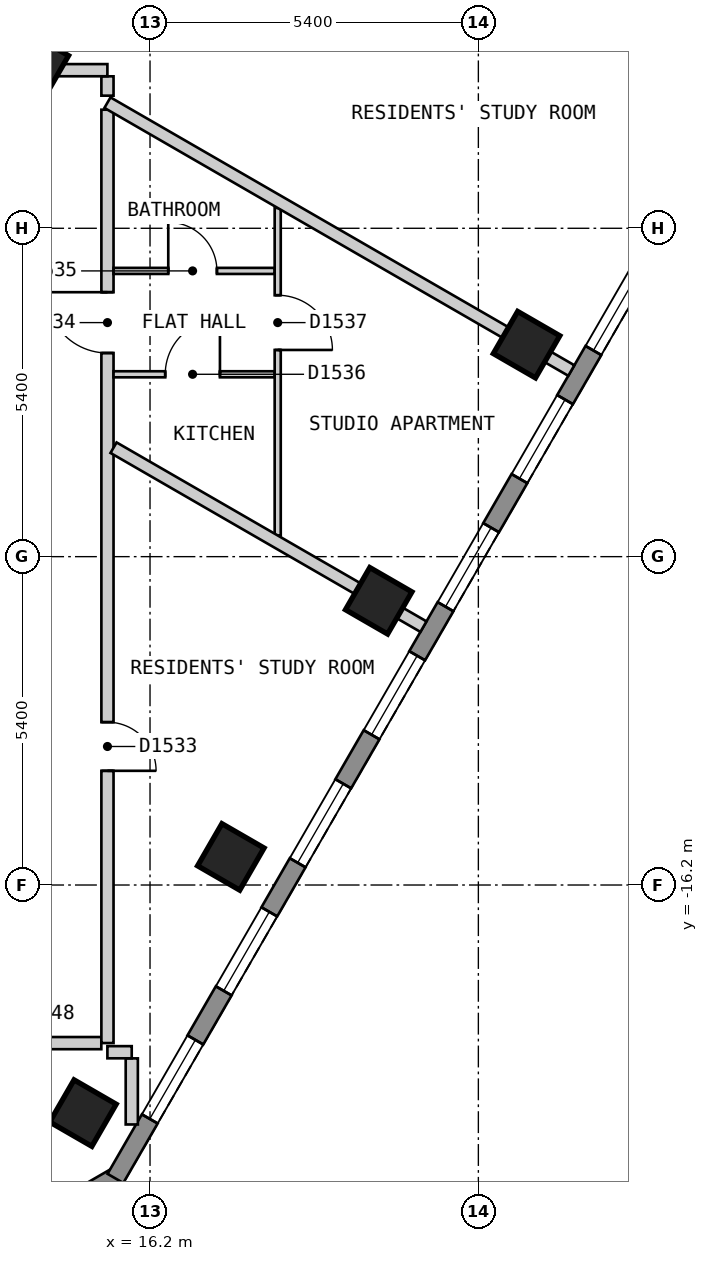
"""IFC4 building model, lengths in metres.
Left out: names, types, materials, properties, quantities, classifications, styles, units other than length and angle.
Written with IfcOpenShell. Run it as: python <this file> out.ifc"""

import sys

from ifc_helpers import new_model, si_unit, direction, frame, frame_2d, origin, origin_2d, place, context, subcontext, project, spatial, polyline, rectangle, outline, extrude, element, fill, save


model = new_model("IFC4")
c1 = context("Model", 3, precision=1e-05, world=origin(), true_north=direction((0.0, 1.0)))
c2 = subcontext(c1, "Body", "Model", "MODEL_VIEW")
j1 = project(units=[si_unit("LENGTHUNIT", "METRE"), si_unit("PLANEANGLEUNIT", "RADIAN")], contexts=[c1])
p1 = place(None, origin())
s1 = spatial("IfcSite", under=j1, at=p1, CompositionType="ELEMENT")
p2 = place(p1, origin())
s2 = spatial("IfcBuilding", under=s1, at=p2, CompositionType="ELEMENT")
p3 = place(p2, frame((0.0, 0.0, 196.2)))
s3 = spatial("IfcBuildingStorey", under=s2, at=p3, CompositionType="ELEMENT", Elevation=196.2)
for number, where, z_axis, x_axis in (
    (1, (15.097, -19.951, 0.0), (0.0, 0.0, 1.0), (0.5, 0.866, 0.0)),
    (2, (17.529, -15.738, 0.0), (0.0, 0.0, 1.0), (0.5, 0.866, 0.0)),
    (3, (19.961, -11.526, 0.0), (0.0, 0.0, 1.0), (0.5, 0.866, 0.0)),
    (4, (22.393, -7.314, 0.0), (0.0, 0.0, 1.0), (0.5, 0.866, 0.0)),
):
    element("IfcColumn", number, at=place(p3, frame(where, z_axis=z_axis, x_axis=x_axis)), inside=s3, PredefinedType="COLUMN", context=c2, shape_type="SweptSolid", body=[
        extrude(rectangle(XDim=0.8, YDim=0.8, at=origin_2d()), origin(), (0.0, 0.0, 1.0), 3.0),
    ])
p4 = place(p3, frame((14.382, -2.689, 0.0), z_axis=(0.0, 0.0, 1.0), x_axis=(0.5, 0.866025403784, 0.0)))
e5 = element("IfcColumn", 5, at=p4, inside=s3, PredefinedType="COLUMN", context=c2, shape_type="SweptSolid", body=[
    extrude(rectangle(XDim=0.7, YDim=0.7, at=origin_2d()), origin(), (0.0, 0.0, 1.0), 3.0),
])
p5 = place(p3, frame((11.356, -23.47, 0.0), z_axis=(0.0, 0.0, 1.0), x_axis=(0.866022959057, 0.500004234368, 0.0)))
e6 = element("IfcWall", 6, at=p5, inside=s3, PredefinedType="SOLIDWALL", context=c2, shape_type="SweptSolid", body=[
    extrude(outline(polyline([(0.0, -0.15), (5.0, -0.15), (4.92, 0.15), (0.08, 0.15), (0.0, -0.15)])), origin(), (0.0, 0.0, 1.0), 2.6),
])
p6 = place(p5, frame((0.65, 0.0, 0.15)))
e7 = element("IfcOpeningElement", 7, at=p6, cuts=e6, PredefinedType="OPENING", context=c2, shape_type="SweptSolid", body=[
    extrude(rectangle(XDim=1.2, YDim=2.1, at=frame_2d((0.6, 1.05))), frame((0.0, 0.16, 0.0), z_axis=(0.0, -1.0, 0.0), x_axis=(1.0, 0.0, 0.0)), (0.0, 0.0, 1.0), 0.32),
])
p7 = place(p5, frame((3.149, 0.0, 0.15)))
e8 = element("IfcOpeningElement", 8, at=p7, cuts=e6, PredefinedType="OPENING", context=c2, shape_type="SweptSolid", body=[
    extrude(rectangle(XDim=1.2, YDim=2.1, at=frame_2d((0.6, 1.05))), frame((0.0, 0.16, 0.0), z_axis=(0.0, -1.0, 0.0), x_axis=(1.0, 0.0, 0.0)), (0.0, 0.0, 1.0), 0.32),
])
p8 = place(p3, frame((15.631, -21.025, 0.0), z_axis=(0.0, 0.0, 1.0), x_axis=(0.500018670445, 0.86601462413, 0.0)))
e9 = element("IfcWall", 9, at=p8, inside=s3, PredefinedType="SOLIDWALL", context=c2, shape_type="SweptSolid", body=[
    extrude(outline(polyline([(0.0, -0.15), (20.785, -0.15), (20.705, 0.15), (0.08, 0.15), (0.0, -0.15)])), origin(), (0.0, 0.0, 1.0), 2.6),
])
p9 = place(p8, frame((1.13, 0.0, 0.15)))
e10 = element("IfcOpeningElement", 10, at=p9, cuts=e9, PredefinedType="OPENING", context=c2, shape_type="SweptSolid", body=[
    extrude(rectangle(XDim=1.5, YDim=2.1, at=frame_2d((0.75, 1.05))), frame((0.0, 0.16, 0.0), z_axis=(0.0, -1.0, 0.0), x_axis=(1.0, 0.0, 0.0)), (0.0, 0.0, 1.0), 0.32),
])
p10 = place(p8, frame((3.562, 0.0, 0.15)))
e11 = element("IfcOpeningElement", 11, at=p10, cuts=e9, PredefinedType="OPENING", context=c2, shape_type="SweptSolid", body=[
    extrude(rectangle(XDim=1.5, YDim=2.1, at=frame_2d((0.75, 1.05))), frame((0.0, 0.16, 0.0), z_axis=(0.0, -1.0, 0.0), x_axis=(1.0, 0.0, 0.0)), (0.0, 0.0, 1.0), 0.32),
])
p11 = place(p8, frame((5.994, 0.0, 0.15)))
e12 = element("IfcOpeningElement", 12, at=p11, cuts=e9, PredefinedType="OPENING", context=c2, shape_type="SweptSolid", body=[
    extrude(rectangle(XDim=1.5, YDim=2.1, at=frame_2d((0.75, 1.05))), frame((0.0, 0.16, 0.0), z_axis=(0.0, -1.0, 0.0), x_axis=(1.0, 0.0, 0.0)), (0.0, 0.0, 1.0), 0.32),
])
p12 = place(p8, frame((8.425, 0.0, 0.15)))
e13 = element("IfcOpeningElement", 13, at=p12, cuts=e9, PredefinedType="OPENING", context=c2, shape_type="SweptSolid", body=[
    extrude(rectangle(XDim=1.5, YDim=2.1, at=frame_2d((0.75, 1.05))), frame((0.0, 0.16, 0.0), z_axis=(0.0, -1.0, 0.0), x_axis=(1.0, 0.0, 0.0)), (0.0, 0.0, 1.0), 0.32),
])
p13 = place(p8, frame((10.857, 0.0, 0.15)))
e14 = element("IfcOpeningElement", 14, at=p13, cuts=e9, PredefinedType="OPENING", context=c2, shape_type="SweptSolid", body=[
    extrude(rectangle(XDim=1.5, YDim=2.1, at=frame_2d((0.75, 1.05))), frame((0.0, 0.16, 0.0), z_axis=(0.0, -1.0, 0.0), x_axis=(1.0, 0.0, 0.0)), (0.0, 0.0, 1.0), 0.32),
])
p14 = place(p8, frame((13.289, 0.0, 0.15)))
e15 = element("IfcOpeningElement", 15, at=p14, cuts=e9, PredefinedType="OPENING", context=c2, shape_type="SweptSolid", body=[
    extrude(rectangle(XDim=1.5, YDim=2.1, at=frame_2d((0.75, 1.05))), frame((0.0, 0.16, 0.0), z_axis=(0.0, -1.0, 0.0), x_axis=(1.0, 0.0, 0.0)), (0.0, 0.0, 1.0), 0.32),
])
p15 = place(p8, frame((15.722, 0.0, 0.15)))
e16 = element("IfcOpeningElement", 16, at=p15, cuts=e9, PredefinedType="OPENING", context=c2, shape_type="SweptSolid", body=[
    extrude(rectangle(XDim=1.5, YDim=2.1, at=frame_2d((0.75, 1.05))), frame((0.0, 0.16, 0.0), z_axis=(0.0, -1.0, 0.0), x_axis=(1.0, 0.0, 0.0)), (0.0, 0.0, 1.0), 0.32),
])
p16 = place(p8, frame((18.154, 0.0, 0.15)))
e17 = element("IfcOpeningElement", 17, at=p16, cuts=e9, PredefinedType="OPENING", context=c2, shape_type="SweptSolid", body=[
    extrude(rectangle(XDim=1.5, YDim=2.1, at=frame_2d((0.75, 1.05))), frame((0.0, 0.16, 0.0), z_axis=(0.0, -1.0, 0.0), x_axis=(1.0, 0.0, 0.0)), (0.0, 0.0, 1.0), 0.32),
])
p17 = place(p3, frame((15.5, -2.901, 0.0), z_axis=(0.0, 0.0, 1.0), x_axis=(0.0, -1.0, 0.0)))
e18 = element("IfcWall", 18, at=p17, inside=s3, PredefinedType="PARTITIONING", context=c2, shape_type="SweptSolid", body=[
    extrude(rectangle(XDim=0.318, YDim=0.2, at=frame_2d((0.159, 0.0))), origin(), (0.0, 0.0, 1.0), 2.6),
])
p18 = place(p3, frame((13.3, -18.8, 0.0), z_axis=(0.0, 0.0, 1.0), x_axis=(1.0, 0.0, 0.0)))
e19 = element("IfcWall", 19, at=p18, inside=s3, PredefinedType="PARTITIONING", context=c2, shape_type="SweptSolid", body=[
    extrude(rectangle(XDim=2.099, YDim=0.2, at=frame_2d((1.049, 0.0))), origin(), (0.0, 0.0, 1.0), 2.6),
])
p19 = place(p18, frame((0.2, 0.0, 0.0)))
e20 = element("IfcOpeningElement", 20, at=p19, cuts=e19, PredefinedType="OPENING", context=c2, shape_type="SweptSolid", body=[
    extrude(rectangle(XDim=1.0, YDim=2.1, at=frame_2d((0.5, 1.05))), frame((0.0, 0.11, 0.0), z_axis=(0.0, -1.0, 0.0), x_axis=(1.0, 0.0, 0.0)), (0.0, 0.0, 1.0), 0.22),
])
p20 = place(p3, frame((14.433, -2.8, 0.0), z_axis=(0.0, 0.0, 1.0), x_axis=(1.0, 0.0, 0.0)))
e21 = element("IfcWall", 21, at=p20, inside=s3, PredefinedType="PARTITIONING", context=c2, shape_type="SweptSolid", body=[
    extrude(rectangle(XDim=1.066, YDim=0.2, at=frame_2d((0.533, 0.0))), origin(), (0.0, 0.0, 1.0), 2.6),
])
p21 = place(p3, frame((14.318, -2.8, 0.0), z_axis=(0.0, 0.0, 1.0), x_axis=(0.49964693309, 0.866229151122, 0.0)))
e22 = element("IfcWall", 22, at=p21, inside=s3, PredefinedType="PARTITIONING", context=c2, shape_type="SweptSolid", body=[
    extrude(rectangle(XDim=2.426, YDim=0.2, at=frame_2d((1.213, 0.0))), origin(), (0.0, 0.0, 1.0), 2.6),
])
p22 = place(p21, frame((0.886, 0.0, 0.0)))
e23 = element("IfcOpeningElement", 23, at=p22, cuts=e22, PredefinedType="OPENING", context=c2, shape_type="SweptSolid", body=[
    extrude(rectangle(XDim=0.8, YDim=2.1, at=frame_2d((0.4, 1.05))), frame((0.0, 0.11, 0.0), z_axis=(0.0, -1.0, 0.0), x_axis=(1.0, 0.0, 0.0)), (0.0, 0.0, 1.0), 0.22),
])
p23 = place(p3, frame((15.5, -18.799, 0.0), z_axis=(0.0, 0.0, 1.0), x_axis=(0.0, 1.0, 0.0)))
e24 = element("IfcWall", 24, at=p23, inside=s3, PredefinedType="PARTITIONING", context=c2, shape_type="SweptSolid", body=[
    extrude(rectangle(XDim=15.349, YDim=0.2, at=frame_2d((7.675, 0.0))), origin(), (0.0, 0.0, 1.0), 2.6),
])
p24 = place(p23, frame((4.477, 0.0, 0.0)))
e25 = element("IfcOpeningElement", 25, at=p24, cuts=e24, PredefinedType="OPENING", context=c2, shape_type="SweptSolid", body=[
    extrude(rectangle(XDim=0.8, YDim=2.1, at=frame_2d((0.4, 1.05))), frame((0.0, 0.11, 0.0), z_axis=(0.0, -1.0, 0.0), x_axis=(1.0, 0.0, 0.0)), (0.0, 0.0, 1.0), 0.22),
])
p25 = place(p23, frame((11.348, 0.0, 0.0)))
e26 = element("IfcOpeningElement", 26, at=p25, cuts=e24, PredefinedType="OPENING", context=c2, shape_type="SweptSolid", body=[
    extrude(rectangle(XDim=1.0, YDim=2.1, at=frame_2d((0.5, 1.05))), frame((0.0, 0.11, 0.0), z_axis=(0.0, -1.0, 0.0), x_axis=(1.0, 0.0, 0.0)), (0.0, 0.0, 1.0), 0.22),
])
p26 = place(p3, frame((15.6, -6.101, 0.0), z_axis=(0.0, 0.0, 1.0), x_axis=(1.0, 0.0, 0.0)))
e27 = element("IfcWall", 27, at=p26, inside=s3, PredefinedType="PARTITIONING", context=c2, shape_type="SweptSolid", body=[
    extrude(rectangle(XDim=2.65, YDim=0.1, at=frame_2d((1.325, 0.0))), origin(), (0.0, 0.0, 1.0), 2.6),
])
p27 = place(p26, frame((0.9, 0.0, 0.0)))
e28 = element("IfcOpeningElement", 28, at=p27, cuts=e27, PredefinedType="OPENING", context=c2, shape_type="SweptSolid", body=[
    extrude(rectangle(XDim=0.8, YDim=2.1, at=frame_2d((0.4, 1.05))), frame((0.0, 0.06, 0.0), z_axis=(0.0, -1.0, 0.0), x_axis=(1.0, 0.0, 0.0)), (0.0, 0.0, 1.0), 0.12),
])
p28 = place(p3, frame((15.6, -7.801, 0.0), z_axis=(0.0, 0.0, 1.0), x_axis=(1.0, 0.0, 0.0)))
e29 = element("IfcWall", 29, at=p28, inside=s3, PredefinedType="PARTITIONING", context=c2, shape_type="SweptSolid", body=[
    extrude(rectangle(XDim=2.65, YDim=0.1, at=frame_2d((1.325, 0.0))), origin(), (0.0, 0.0, 1.0), 2.6),
])
p29 = place(p28, frame((0.85, 0.0, 0.0)))
e30 = element("IfcOpeningElement", 30, at=p29, cuts=e29, PredefinedType="OPENING", context=c2, shape_type="SweptSolid", body=[
    extrude(rectangle(XDim=0.9, YDim=2.1, at=frame_2d((0.45, 1.05))), frame((0.0, 0.06, 0.0), z_axis=(0.0, -1.0, 0.0), x_axis=(1.0, 0.0, 0.0)), (0.0, 0.0, 1.0), 0.12),
])
p30 = place(p3, frame((18.3, -10.452, 0.0), z_axis=(0.0, 0.0, 1.0), x_axis=(0.0, 1.0, 0.0)))
e31 = element("IfcWall", 31, at=p30, inside=s3, PredefinedType="PARTITIONING", context=c2, shape_type="SweptSolid", body=[
    extrude(rectangle(XDim=5.386, YDim=0.1, at=frame_2d((2.693, 0.0))), origin(), (0.0, 0.0, 1.0), 2.6),
])
p31 = place(p30, frame((3.051, 0.0, 0.0)))
e32 = element("IfcOpeningElement", 32, at=p31, cuts=e31, PredefinedType="OPENING", context=c2, shape_type="SweptSolid", body=[
    extrude(rectangle(XDim=0.9, YDim=2.1, at=frame_2d((0.45, 1.05))), frame((0.0, 0.06, 0.0), z_axis=(0.0, -1.0, 0.0), x_axis=(1.0, 0.0, 0.0)), (0.0, 0.0, 1.0), 0.12),
])
p32 = place(p3, frame((15.9, -19.051, 0.0), z_axis=(0.0, 0.0, 1.0), x_axis=(0.0, -1.0, 0.0)))
e33 = element("IfcWall", 33, at=p32, inside=s3, PredefinedType="PARTITIONING", context=c2, shape_type="SweptSolid", body=[
    extrude(rectangle(XDim=1.087, YDim=0.2, at=frame_2d((0.543, 0.0))), origin(), (0.0, 0.0, 1.0), 2.6),
])
p33 = place(p3, frame((15.6, -9.008, 0.0), z_axis=(0.0, 0.0, 1.0), x_axis=(0.866013576751, -0.500020484464, 0.0)))
e34 = element("IfcWall", 34, at=p33, inside=s3, PredefinedType="PARTITIONING", context=c2, shape_type="SweptSolid", body=[
    extrude(rectangle(XDim=5.885, YDim=0.2, at=frame_2d((2.943, 0.0))), origin(), (0.0, 0.0, 1.0), 2.6),
])
p34 = place(p3, frame((15.5, -3.334, 0.0), z_axis=(0.0, 0.0, 1.0), x_axis=(0.866001896501, -0.5000407136, 0.0)))
e35 = element("IfcWall", 35, at=p34, inside=s3, PredefinedType="PARTITIONING", context=c2, shape_type="SweptSolid", body=[
    extrude(rectangle(XDim=8.809, YDim=0.2, at=frame_2d((4.405, 0.0))), origin(), (0.0, 0.0, 1.0), 2.6),
])
p35 = place(p3, frame((15.499, -18.95, 0.0), z_axis=(0.0, 0.0, 1.0), x_axis=(1.0, 0.0, 0.0)))
e36 = element("IfcWall", 36, at=p35, inside=s3, PredefinedType="PARTITIONING", context=c2, shape_type="SweptSolid", body=[
    extrude(rectangle(XDim=0.4, YDim=0.2, at=frame_2d((0.2, 0.0))), origin(), (0.0, 0.0, 1.0), 2.6),
])
p36 = place(p9, origin())
e37 = element("IfcWindow", 37, at=p36, inside=s3, PartitioningType="SINGLE_PANEL", PredefinedType="WINDOW", context=c2, shape_type="SweptSolid", body=[
    extrude(rectangle(XDim=1.5, YDim=2.1, at=frame_2d((0.75, 1.05))), frame((0.0, 0.03, 0.0), z_axis=(0.0, -1.0, 0.0), x_axis=(1.0, 0.0, 0.0)), (0.0, 0.0, 1.0), 0.06),
])
fill(e10, e37)
p37 = place(p10, origin())
e38 = element("IfcWindow", 38, at=p37, inside=s3, PartitioningType="SINGLE_PANEL", PredefinedType="WINDOW", context=c2, shape_type="SweptSolid", body=[
    extrude(rectangle(XDim=1.5, YDim=2.1, at=frame_2d((0.75, 1.05))), frame((0.0, 0.03, 0.0), z_axis=(0.0, -1.0, 0.0), x_axis=(1.0, 0.0, 0.0)), (0.0, 0.0, 1.0), 0.06),
])
fill(e11, e38)
p38 = place(p11, origin())
e39 = element("IfcWindow", 39, at=p38, inside=s3, PartitioningType="SINGLE_PANEL", PredefinedType="WINDOW", context=c2, shape_type="SweptSolid", body=[
    extrude(rectangle(XDim=1.5, YDim=2.1, at=frame_2d((0.75, 1.05))), frame((0.0, 0.03, 0.0), z_axis=(0.0, -1.0, 0.0), x_axis=(1.0, 0.0, 0.0)), (0.0, 0.0, 1.0), 0.06),
])
fill(e12, e39)
p39 = place(p12, origin())
e40 = element("IfcWindow", 40, at=p39, inside=s3, PartitioningType="SINGLE_PANEL", PredefinedType="WINDOW", context=c2, shape_type="SweptSolid", body=[
    extrude(rectangle(XDim=1.5, YDim=2.1, at=frame_2d((0.75, 1.05))), frame((0.0, 0.03, 0.0), z_axis=(0.0, -1.0, 0.0), x_axis=(1.0, 0.0, 0.0)), (0.0, 0.0, 1.0), 0.06),
])
fill(e13, e40)
p40 = place(p13, origin())
e41 = element("IfcWindow", 41, at=p40, inside=s3, PartitioningType="SINGLE_PANEL", PredefinedType="WINDOW", context=c2, shape_type="SweptSolid", body=[
    extrude(rectangle(XDim=1.5, YDim=2.1, at=frame_2d((0.75, 1.05))), frame((0.0, 0.03, 0.0), z_axis=(0.0, -1.0, 0.0), x_axis=(1.0, 0.0, 0.0)), (0.0, 0.0, 1.0), 0.06),
])
fill(e14, e41)
p41 = place(p14, origin())
e42 = element("IfcWindow", 42, at=p41, inside=s3, PartitioningType="SINGLE_PANEL", PredefinedType="WINDOW", context=c2, shape_type="SweptSolid", body=[
    extrude(rectangle(XDim=1.5, YDim=2.1, at=frame_2d((0.75, 1.05))), frame((0.0, 0.03, 0.0), z_axis=(0.0, -1.0, 0.0), x_axis=(1.0, 0.0, 0.0)), (0.0, 0.0, 1.0), 0.06),
])
fill(e15, e42)
p42 = place(p15, origin())
e43 = element("IfcWindow", 43, at=p42, inside=s3, PartitioningType="SINGLE_PANEL", PredefinedType="WINDOW", context=c2, shape_type="SweptSolid", body=[
    extrude(rectangle(XDim=1.5, YDim=2.1, at=frame_2d((0.75, 1.05))), frame((0.0, 0.03, 0.0), z_axis=(0.0, -1.0, 0.0), x_axis=(1.0, 0.0, 0.0)), (0.0, 0.0, 1.0), 0.06),
])
fill(e16, e43)
p43 = place(p24, origin())
e44 = element("IfcDoor", 44, at=p43, inside=s3, OperationType="SINGLE_SWING_LEFT", PredefinedType="DOOR", context=c2, shape_type="SweptSolid", body=[
    extrude(rectangle(XDim=0.8, YDim=2.1, at=frame_2d((0.4, 1.05))), frame((0.0, 0.025, 0.0), z_axis=(0.0, -1.0, 0.0), x_axis=(1.0, 0.0, 0.0)), (0.0, 0.0, 1.0), 0.05),
])
fill(e25, e44)
p44 = place(p25, origin())
e45 = element("IfcDoor", 45, at=p44, inside=s3, OperationType="SINGLE_SWING_RIGHT", PredefinedType="DOOR", context=c2, shape_type="SweptSolid", body=[
    extrude(rectangle(XDim=1.0, YDim=2.1, at=frame_2d((0.5, 1.05))), frame((0.0, 0.025, 0.0), z_axis=(0.0, -1.0, 0.0), x_axis=(1.0, 0.0, 0.0)), (0.0, 0.0, 1.0), 0.05),
])
fill(e26, e45)
p45 = place(p27, origin())
e46 = element("IfcDoor", 46, at=p45, inside=s3, OperationType="SINGLE_SWING_LEFT", PredefinedType="DOOR", context=c2, shape_type="SweptSolid", body=[
    extrude(rectangle(XDim=0.8, YDim=2.1, at=frame_2d((0.4, 1.05))), frame((0.0, 0.025, 0.0), z_axis=(0.0, -1.0, 0.0), x_axis=(1.0, 0.0, 0.0)), (0.0, 0.0, 1.0), 0.05),
])
fill(e28, e46)
p46 = place(p29, origin())
e47 = element("IfcDoor", 47, at=p46, inside=s3, OperationType="SINGLE_SWING_RIGHT", PredefinedType="DOOR", context=c2, shape_type="SweptSolid", body=[
    extrude(rectangle(XDim=0.9, YDim=2.1, at=frame_2d((0.45, 1.05))), frame((0.0, 0.025, 0.0), z_axis=(0.0, -1.0, 0.0), x_axis=(1.0, 0.0, 0.0)), (0.0, 0.0, 1.0), 0.05),
])
fill(e30, e47)
p47 = place(p31, origin())
e48 = element("IfcDoor", 48, at=p47, inside=s3, OperationType="SINGLE_SWING_LEFT", PredefinedType="DOOR", context=c2, shape_type="SweptSolid", body=[
    extrude(rectangle(XDim=0.9, YDim=2.1, at=frame_2d((0.45, 1.05))), frame((0.0, 0.025, 0.0), z_axis=(0.0, -1.0, 0.0), x_axis=(1.0, 0.0, 0.0)), (0.0, 0.0, 1.0), 0.05),
])
fill(e32, e48)
save(model, sys.argv[1])
